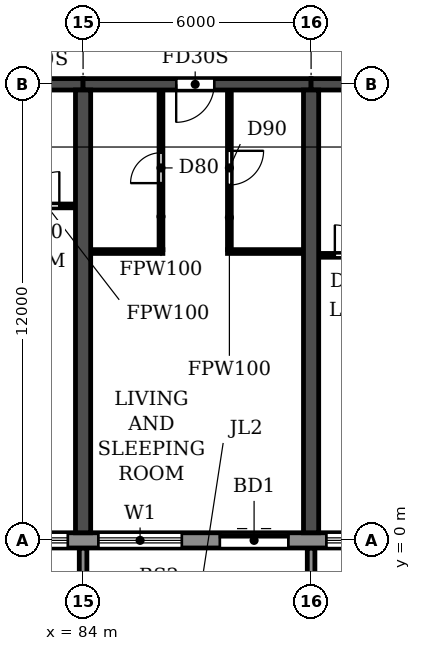
"""IFC4 building model, lengths in metres.
Left out: names, types, materials, properties, quantities, classifications, styles, units other than length and angle.
Written with IfcOpenShell. Run it as: python <this file> out.ifc"""

import sys

from ifc_helpers import new_model, si_unit, direction, frame, frame_2d, origin, place, context, subcontext, project, spatial, polyline, rectangle, outline, extrude, source, transform, mapped, element, fill, save


model = new_model("IFC4")
c1 = context("Model", 3, precision=1e-05, world=origin(), true_north=direction((0.0, 1.0)))
c2 = subcontext(c1, "Body", "Model", "MODEL_VIEW")
j1 = project(units=[si_unit("LENGTHUNIT", "METRE"), si_unit("PLANEANGLEUNIT", "RADIAN")], contexts=[c1])
p1 = place(None, origin())
s1 = spatial("IfcSite", under=j1, at=p1, CompositionType="ELEMENT")
p2 = place(p1, origin())
s2 = spatial("IfcBuilding", under=s1, at=p2, CompositionType="ELEMENT")
p3 = place(p2, frame((0.0, 0.0, 49.8)))
s3 = spatial("IfcBuildingStorey", under=s2, at=p3, CompositionType="ELEMENT", Elevation=49.8)
for number, where, z_axis, x_axis in (
    (1, (84.0, 0.2, 0.0), (0.0, 0.0, 1.0), (0.0, 1.0, 0.0)),
    (2, (90.0, 0.2, 0.0), (0.0, 0.0, 1.0), (0.0, 1.0, 0.0)),
):
    element("IfcWall", number, at=place(p3, frame(where, z_axis=z_axis, x_axis=x_axis)), inside=s3, PredefinedType="SHEAR", context=c2, shape_type="SweptSolid", body=[
        extrude(rectangle(XDim=11.65, YDim=0.4, at=frame_2d((5.825, 0.0))), origin(), (0.0, 0.0, 1.0), 3.0),
    ])
p4 = place(p3, frame((78.0, 12.0, 0.0), z_axis=(0.0, 0.0, 1.0), x_axis=(1.0, 0.0, 0.0)))
e3 = element("IfcWall", 3, at=p4, inside=s3, PredefinedType="SHEAR", context=c2, shape_type="SweptSolid", body=[
    extrude(rectangle(XDim=6.0, YDim=0.3, at=frame_2d((3.0, 0.0))), origin(), (0.0, 0.0, 1.0), 2.4),
])
p5 = place(p4, frame((2.45, 0.0, 0.0)))
e4 = element("IfcOpeningElement", 4, at=p5, cuts=e3, PredefinedType="OPENING", context=c2, shape_type="SweptSolid", body=[
    extrude(rectangle(XDim=1.0, YDim=2.1, at=frame_2d((0.5, 1.05))), frame((0.0, 0.16, 0.0), z_axis=(0.0, -1.0, 0.0), x_axis=(1.0, 0.0, 0.0)), (0.0, 0.0, 1.0), 0.32),
])
p6 = place(p3, frame((84.0, 12.0, 0.0), z_axis=(0.0, 0.0, 1.0), x_axis=(1.0, 0.0, 0.0)))
e5 = element("IfcWall", 5, at=p6, inside=s3, PredefinedType="SHEAR", context=c2, shape_type="SweptSolid", body=[
    extrude(rectangle(XDim=6.0, YDim=0.3, at=frame_2d((3.0, 0.0))), origin(), (0.0, 0.0, 1.0), 2.4),
])
p7 = place(p6, frame((2.45, 0.0, 0.0)))
e6 = element("IfcOpeningElement", 6, at=p7, cuts=e5, PredefinedType="OPENING", context=c2, shape_type="SweptSolid", body=[
    extrude(rectangle(XDim=1.0, YDim=2.1, at=frame_2d((0.5, 1.05))), frame((0.0, 0.16, 0.0), z_axis=(0.0, -1.0, 0.0), x_axis=(1.0, 0.0, 0.0)), (0.0, 0.0, 1.0), 0.32),
])
p8 = place(p3, frame((90.0, 12.0, 0.0), z_axis=(0.0, 0.0, 1.0), x_axis=(1.0, 0.0, 0.0)))
e7 = element("IfcWall", 7, at=p8, inside=s3, PredefinedType="SHEAR", context=c2, shape_type="SweptSolid", body=[
    extrude(rectangle(XDim=6.0, YDim=0.3, at=frame_2d((3.0, 0.0))), origin(), (0.0, 0.0, 1.0), 2.4),
])
p9 = place(p8, frame((2.45, 0.0, 0.0)))
e8 = element("IfcOpeningElement", 8, at=p9, cuts=e7, PredefinedType="OPENING", context=c2, shape_type="SweptSolid", body=[
    extrude(rectangle(XDim=1.0, YDim=2.1, at=frame_2d((0.5, 1.05))), frame((0.0, 0.16, 0.0), z_axis=(0.0, -1.0, 0.0), x_axis=(1.0, 0.0, 0.0)), (0.0, 0.0, 1.0), 0.32),
])
p10 = place(p3, frame((4.683, 0.0, 0.0), z_axis=(0.0, 0.0, 1.0), x_axis=(1.0, 0.0, 0.0)))
e9 = element("IfcWall", 9, at=p10, inside=s3, PredefinedType="STANDARD", context=c2, shape_type="SweptSolid", body=[
    extrude(rectangle(XDim=92.634, YDim=0.4, at=frame_2d((46.317, 0.0))), origin(), (0.0, 0.0, 1.0), 3.0),
])
p11 = place(p10, frame((1.717, 0.0, 0.9)))
e10 = element("IfcOpeningElement", 10, at=p11, cuts=e9, PredefinedType="OPENING", context=c2, shape_type="SweptSolid", body=[
    extrude(rectangle(XDim=2.2, YDim=1.5, at=frame_2d((1.1, 0.75))), frame((0.0, 0.21, 0.0), z_axis=(0.0, -1.0, 0.0), x_axis=(1.0, 0.0, 0.0)), (0.0, 0.0, 1.0), 0.42),
])
p12 = place(p10, frame((4.717, 0.0, 0.9)))
e11 = element("IfcOpeningElement", 11, at=p12, cuts=e9, PredefinedType="OPENING", context=c2, shape_type="SweptSolid", body=[
    extrude(rectangle(XDim=2.2, YDim=1.5, at=frame_2d((1.1, 0.75))), frame((0.0, 0.21, 0.0), z_axis=(0.0, -1.0, 0.0), x_axis=(1.0, 0.0, 0.0)), (0.0, 0.0, 1.0), 0.42),
])
p13 = place(p10, frame((7.717, 0.0, 0.9)))
e12 = element("IfcOpeningElement", 12, at=p13, cuts=e9, PredefinedType="OPENING", context=c2, shape_type="SweptSolid", body=[
    extrude(rectangle(XDim=2.2, YDim=1.5, at=frame_2d((1.1, 0.75))), frame((0.0, 0.21, 0.0), z_axis=(0.0, -1.0, 0.0), x_axis=(1.0, 0.0, 0.0)), (0.0, 0.0, 1.0), 0.42),
])
p14 = place(p10, frame((10.917, 0.0, 0.0)))
e13 = element("IfcOpeningElement", 13, at=p14, cuts=e9, PredefinedType="OPENING", context=c2, shape_type="SweptSolid", body=[
    extrude(rectangle(XDim=1.8, YDim=2.4, at=frame_2d((0.9, 1.2))), frame((0.0, 0.21, 0.0), z_axis=(0.0, -1.0, 0.0), x_axis=(1.0, 0.0, 0.0)), (0.0, 0.0, 1.0), 0.42),
])
p15 = place(p10, frame((13.717, 0.0, 0.9)))
e14 = element("IfcOpeningElement", 14, at=p15, cuts=e9, PredefinedType="OPENING", context=c2, shape_type="SweptSolid", body=[
    extrude(rectangle(XDim=2.2, YDim=1.5, at=frame_2d((1.1, 0.75))), frame((0.0, 0.21, 0.0), z_axis=(0.0, -1.0, 0.0), x_axis=(1.0, 0.0, 0.0)), (0.0, 0.0, 1.0), 0.42),
])
p16 = place(p10, frame((16.717, 0.0, 0.9)))
e15 = element("IfcOpeningElement", 15, at=p16, cuts=e9, PredefinedType="OPENING", context=c2, shape_type="SweptSolid", body=[
    extrude(rectangle(XDim=2.2, YDim=1.5, at=frame_2d((1.1, 0.75))), frame((0.0, 0.21, 0.0), z_axis=(0.0, -1.0, 0.0), x_axis=(1.0, 0.0, 0.0)), (0.0, 0.0, 1.0), 0.42),
])
p17 = place(p10, frame((19.917, 0.0, 0.0)))
e16 = element("IfcOpeningElement", 16, at=p17, cuts=e9, PredefinedType="OPENING", context=c2, shape_type="SweptSolid", body=[
    extrude(rectangle(XDim=1.8, YDim=2.4, at=frame_2d((0.9, 1.2))), frame((0.0, 0.21, 0.0), z_axis=(0.0, -1.0, 0.0), x_axis=(1.0, 0.0, 0.0)), (0.0, 0.0, 1.0), 0.42),
])
p18 = place(p10, frame((22.717, 0.0, 0.9)))
e17 = element("IfcOpeningElement", 17, at=p18, cuts=e9, PredefinedType="OPENING", context=c2, shape_type="SweptSolid", body=[
    extrude(rectangle(XDim=2.2, YDim=1.5, at=frame_2d((1.1, 0.75))), frame((0.0, 0.21, 0.0), z_axis=(0.0, -1.0, 0.0), x_axis=(1.0, 0.0, 0.0)), (0.0, 0.0, 1.0), 0.42),
])
p19 = place(p10, frame((25.717, 0.0, 0.9)))
e18 = element("IfcOpeningElement", 18, at=p19, cuts=e9, PredefinedType="OPENING", context=c2, shape_type="SweptSolid", body=[
    extrude(rectangle(XDim=2.2, YDim=1.5, at=frame_2d((1.1, 0.75))), frame((0.0, 0.21, 0.0), z_axis=(0.0, -1.0, 0.0), x_axis=(1.0, 0.0, 0.0)), (0.0, 0.0, 1.0), 0.42),
])
p20 = place(p10, frame((28.717, 0.0, 0.9)))
e19 = element("IfcOpeningElement", 19, at=p20, cuts=e9, PredefinedType="OPENING", context=c2, shape_type="SweptSolid", body=[
    extrude(rectangle(XDim=2.2, YDim=1.5, at=frame_2d((1.1, 0.75))), frame((0.0, 0.21, 0.0), z_axis=(0.0, -1.0, 0.0), x_axis=(1.0, 0.0, 0.0)), (0.0, 0.0, 1.0), 0.42),
])
p21 = place(p10, frame((31.717, 0.0, 0.9)))
e20 = element("IfcOpeningElement", 20, at=p21, cuts=e9, PredefinedType="OPENING", context=c2, shape_type="SweptSolid", body=[
    extrude(rectangle(XDim=2.2, YDim=1.5, at=frame_2d((1.1, 0.75))), frame((0.0, 0.21, 0.0), z_axis=(0.0, -1.0, 0.0), x_axis=(1.0, 0.0, 0.0)), (0.0, 0.0, 1.0), 0.42),
])
p22 = place(p10, frame((34.917, 0.0, 0.0)))
e21 = element("IfcOpeningElement", 21, at=p22, cuts=e9, PredefinedType="OPENING", context=c2, shape_type="SweptSolid", body=[
    extrude(rectangle(XDim=1.8, YDim=2.4, at=frame_2d((0.9, 1.2))), frame((0.0, 0.21, 0.0), z_axis=(0.0, -1.0, 0.0), x_axis=(1.0, 0.0, 0.0)), (0.0, 0.0, 1.0), 0.42),
])
p23 = place(p10, frame((37.717, 0.0, 0.9)))
e22 = element("IfcOpeningElement", 22, at=p23, cuts=e9, PredefinedType="OPENING", context=c2, shape_type="SweptSolid", body=[
    extrude(rectangle(XDim=2.2, YDim=1.5, at=frame_2d((1.1, 0.75))), frame((0.0, 0.21, 0.0), z_axis=(0.0, -1.0, 0.0), x_axis=(1.0, 0.0, 0.0)), (0.0, 0.0, 1.0), 0.42),
])
p24 = place(p10, frame((40.717, 0.0, 0.9)))
e23 = element("IfcOpeningElement", 23, at=p24, cuts=e9, PredefinedType="OPENING", context=c2, shape_type="SweptSolid", body=[
    extrude(rectangle(XDim=2.2, YDim=1.5, at=frame_2d((1.1, 0.75))), frame((0.0, 0.21, 0.0), z_axis=(0.0, -1.0, 0.0), x_axis=(1.0, 0.0, 0.0)), (0.0, 0.0, 1.0), 0.42),
])
p25 = place(p10, frame((43.717, 0.0, 0.9)))
e24 = element("IfcOpeningElement", 24, at=p25, cuts=e9, PredefinedType="OPENING", context=c2, shape_type="SweptSolid", body=[
    extrude(rectangle(XDim=2.2, YDim=1.5, at=frame_2d((1.1, 0.75))), frame((0.0, 0.21, 0.0), z_axis=(0.0, -1.0, 0.0), x_axis=(1.0, 0.0, 0.0)), (0.0, 0.0, 1.0), 0.42),
])
p26 = place(p10, frame((46.917, 0.0, 0.0)))
e25 = element("IfcOpeningElement", 25, at=p26, cuts=e9, PredefinedType="OPENING", context=c2, shape_type="SweptSolid", body=[
    extrude(rectangle(XDim=1.8, YDim=2.4, at=frame_2d((0.9, 1.2))), frame((0.0, 0.21, 0.0), z_axis=(0.0, -1.0, 0.0), x_axis=(1.0, 0.0, 0.0)), (0.0, 0.0, 1.0), 0.42),
])
p27 = place(p10, frame((49.717, 0.0, 0.9)))
e26 = element("IfcOpeningElement", 26, at=p27, cuts=e9, PredefinedType="OPENING", context=c2, shape_type="SweptSolid", body=[
    extrude(rectangle(XDim=2.2, YDim=1.5, at=frame_2d((1.1, 0.75))), frame((0.0, 0.21, 0.0), z_axis=(0.0, -1.0, 0.0), x_axis=(1.0, 0.0, 0.0)), (0.0, 0.0, 1.0), 0.42),
])
p28 = place(p10, frame((52.717, 0.0, 0.9)))
e27 = element("IfcOpeningElement", 27, at=p28, cuts=e9, PredefinedType="OPENING", context=c2, shape_type="SweptSolid", body=[
    extrude(rectangle(XDim=2.2, YDim=1.5, at=frame_2d((1.1, 0.75))), frame((0.0, 0.21, 0.0), z_axis=(0.0, -1.0, 0.0), x_axis=(1.0, 0.0, 0.0)), (0.0, 0.0, 1.0), 0.42),
])
p29 = place(p10, frame((55.717, 0.0, 0.9)))
e28 = element("IfcOpeningElement", 28, at=p29, cuts=e9, PredefinedType="OPENING", context=c2, shape_type="SweptSolid", body=[
    extrude(rectangle(XDim=2.2, YDim=1.5, at=frame_2d((1.1, 0.75))), frame((0.0, 0.21, 0.0), z_axis=(0.0, -1.0, 0.0), x_axis=(1.0, 0.0, 0.0)), (0.0, 0.0, 1.0), 0.42),
])
p30 = place(p10, frame((58.917, 0.0, 0.0)))
e29 = element("IfcOpeningElement", 29, at=p30, cuts=e9, PredefinedType="OPENING", context=c2, shape_type="SweptSolid", body=[
    extrude(rectangle(XDim=1.8, YDim=2.4, at=frame_2d((0.9, 1.2))), frame((0.0, 0.21, 0.0), z_axis=(0.0, -1.0, 0.0), x_axis=(1.0, 0.0, 0.0)), (0.0, 0.0, 1.0), 0.42),
])
p31 = place(p10, frame((61.717, 0.0, 0.9)))
e30 = element("IfcOpeningElement", 30, at=p31, cuts=e9, PredefinedType="OPENING", context=c2, shape_type="SweptSolid", body=[
    extrude(rectangle(XDim=2.2, YDim=1.5, at=frame_2d((1.1, 0.75))), frame((0.0, 0.21, 0.0), z_axis=(0.0, -1.0, 0.0), x_axis=(1.0, 0.0, 0.0)), (0.0, 0.0, 1.0), 0.42),
])
p32 = place(p10, frame((64.717, 0.0, 0.9)))
e31 = element("IfcOpeningElement", 31, at=p32, cuts=e9, PredefinedType="OPENING", context=c2, shape_type="SweptSolid", body=[
    extrude(rectangle(XDim=2.2, YDim=1.5, at=frame_2d((1.1, 0.75))), frame((0.0, 0.21, 0.0), z_axis=(0.0, -1.0, 0.0), x_axis=(1.0, 0.0, 0.0)), (0.0, 0.0, 1.0), 0.42),
])
p33 = place(p10, frame((67.717, 0.0, 0.9)))
e32 = element("IfcOpeningElement", 32, at=p33, cuts=e9, PredefinedType="OPENING", context=c2, shape_type="SweptSolid", body=[
    extrude(rectangle(XDim=2.2, YDim=1.5, at=frame_2d((1.1, 0.75))), frame((0.0, 0.21, 0.0), z_axis=(0.0, -1.0, 0.0), x_axis=(1.0, 0.0, 0.0)), (0.0, 0.0, 1.0), 0.42),
])
p34 = place(p10, frame((70.917, 0.0, 0.0)))
e33 = element("IfcOpeningElement", 33, at=p34, cuts=e9, PredefinedType="OPENING", context=c2, shape_type="SweptSolid", body=[
    extrude(rectangle(XDim=1.8, YDim=2.4, at=frame_2d((0.9, 1.2))), frame((0.0, 0.21, 0.0), z_axis=(0.0, -1.0, 0.0), x_axis=(1.0, 0.0, 0.0)), (0.0, 0.0, 1.0), 0.42),
])
p35 = place(p10, frame((73.717, 0.0, 0.9)))
e34 = element("IfcOpeningElement", 34, at=p35, cuts=e9, PredefinedType="OPENING", context=c2, shape_type="SweptSolid", body=[
    extrude(rectangle(XDim=2.2, YDim=1.5, at=frame_2d((1.1, 0.75))), frame((0.0, 0.21, 0.0), z_axis=(0.0, -1.0, 0.0), x_axis=(1.0, 0.0, 0.0)), (0.0, 0.0, 1.0), 0.42),
])
p36 = place(p10, frame((76.717, 0.0, 0.9)))
e35 = element("IfcOpeningElement", 35, at=p36, cuts=e9, PredefinedType="OPENING", context=c2, shape_type="SweptSolid", body=[
    extrude(rectangle(XDim=2.2, YDim=1.5, at=frame_2d((1.1, 0.75))), frame((0.0, 0.21, 0.0), z_axis=(0.0, -1.0, 0.0), x_axis=(1.0, 0.0, 0.0)), (0.0, 0.0, 1.0), 0.42),
])
p37 = place(p10, frame((79.717, 0.0, 0.9)))
e36 = element("IfcOpeningElement", 36, at=p37, cuts=e9, PredefinedType="OPENING", context=c2, shape_type="SweptSolid", body=[
    extrude(rectangle(XDim=2.2, YDim=1.5, at=frame_2d((1.1, 0.75))), frame((0.0, 0.21, 0.0), z_axis=(0.0, -1.0, 0.0), x_axis=(1.0, 0.0, 0.0)), (0.0, 0.0, 1.0), 0.42),
])
p38 = place(p10, frame((82.917, 0.0, 0.0)))
e37 = element("IfcOpeningElement", 37, at=p38, cuts=e9, PredefinedType="OPENING", context=c2, shape_type="SweptSolid", body=[
    extrude(rectangle(XDim=1.8, YDim=2.4, at=frame_2d((0.9, 1.2))), frame((0.0, 0.21, 0.0), z_axis=(0.0, -1.0, 0.0), x_axis=(1.0, 0.0, 0.0)), (0.0, 0.0, 1.0), 0.42),
])
p39 = place(p10, frame((85.717, 0.0, 0.9)))
e38 = element("IfcOpeningElement", 38, at=p39, cuts=e9, PredefinedType="OPENING", context=c2, shape_type="SweptSolid", body=[
    extrude(rectangle(XDim=2.2, YDim=1.5, at=frame_2d((1.1, 0.75))), frame((0.0, 0.21, 0.0), z_axis=(0.0, -1.0, 0.0), x_axis=(1.0, 0.0, 0.0)), (0.0, 0.0, 1.0), 0.42),
])
p40 = place(p10, frame((88.717, 0.0, 0.9)))
e39 = element("IfcOpeningElement", 39, at=p40, cuts=e9, PredefinedType="OPENING", context=c2, shape_type="SweptSolid", body=[
    extrude(rectangle(XDim=2.2, YDim=1.5, at=frame_2d((1.1, 0.75))), frame((0.0, 0.21, 0.0), z_axis=(0.0, -1.0, 0.0), x_axis=(1.0, 0.0, 0.0)), (0.0, 0.0, 1.0), 0.42),
])
m1 = source(origin(), c2, "Body", "SweptSolid", [
    extrude(outline(polyline([(0.0, 0.0), (0.2, 0.0), (0.2, 1.65), (0.0, 1.65), (0.0, 0.0)])), origin(), (0.0, 0.0, 1.0), 3.1),
])
for number, where in (
    (40, (83.9, -1.85, 0.0)),
    (41, (89.9, -1.85, 0.0)),
):
    element("IfcWall", number, at=place(p3, frame(where)), inside=s3, PredefinedType="STANDARD", context=c2, shape_type="MappedRepresentation", body=[
        mapped(m1, transform((0.0, 0.0, 0.0))),
    ])
p41 = place(p3, frame((90.21, 7.5, 0.0), z_axis=(0.0, 0.0, 1.0), x_axis=(1.0, 0.0, 0.0)))
e42 = element("IfcWall", 42, at=p41, inside=s3, PredefinedType="PARTITIONING", context=c2, shape_type="SweptSolid", body=[
    extrude(rectangle(XDim=1.89, YDim=0.1, at=frame_2d((0.945, 0.0))), origin(), (0.0, 0.0, 1.0), 3.0),
])
p42 = place(p41, frame((0.415, 0.0, 0.0)))
e43 = element("IfcOpeningElement", 43, at=p42, cuts=e42, PredefinedType="OPENING", context=c2, shape_type="SweptSolid", body=[
    extrude(rectangle(XDim=0.8, YDim=2.1, at=frame_2d((0.4, 1.05))), frame((0.0, 0.06, 0.0), z_axis=(0.0, -1.0, 0.0), x_axis=(1.0, 0.0, 0.0)), (0.0, 0.0, 1.0), 0.12),
])
p43 = place(p3, frame((84.21, 7.6, 0.0), z_axis=(0.0, 0.0, 1.0), x_axis=(1.0, 0.0, 0.0)))
e44 = element("IfcWall", 44, at=p43, inside=s3, PredefinedType="PARTITIONING", context=c2, shape_type="SweptSolid", body=[
    extrude(rectangle(XDim=1.89, YDim=0.1, at=frame_2d((0.945, 0.0))), origin(), (0.0, 0.0, 1.0), 3.0),
])
p44 = place(p3, frame((87.8, 7.6, 0.0), z_axis=(0.0, 0.0, 1.0), x_axis=(1.0, 0.0, 0.0)))
e45 = element("IfcWall", 45, at=p44, inside=s3, PredefinedType="PARTITIONING", context=c2, shape_type="SweptSolid", body=[
    extrude(rectangle(XDim=1.99, YDim=0.1, at=frame_2d((0.995, 0.0))), origin(), (0.0, 0.0, 1.0), 3.0),
])
p45 = place(p3, frame((81.8, 8.8, 0.0), z_axis=(0.0, 0.0, 1.0), x_axis=(1.0, 0.0, 0.0)))
e46 = element("IfcWall", 46, at=p45, inside=s3, PredefinedType="PARTITIONING", context=c2, shape_type="SweptSolid", body=[
    extrude(rectangle(XDim=1.99, YDim=0.1, at=frame_2d((0.995, 0.0))), origin(), (0.0, 0.0, 1.0), 3.0),
])
p46 = place(p45, frame((0.675, 0.0, 0.0)))
e47 = element("IfcOpeningElement", 47, at=p46, cuts=e46, PredefinedType="OPENING", context=c2, shape_type="SweptSolid", body=[
    extrude(rectangle(XDim=0.9, YDim=2.1, at=frame_2d((0.45, 1.05))), frame((0.0, 0.06, 0.0), z_axis=(0.0, -1.0, 0.0), x_axis=(1.0, 0.0, 0.0)), (0.0, 0.0, 1.0), 0.12),
])
p47 = place(p3, frame((86.05, 7.65, 0.0), z_axis=(0.0, 0.0, 1.0), x_axis=(0.0, 1.0, 0.0)))
e48 = element("IfcWall", 48, at=p47, inside=s3, PredefinedType="PARTITIONING", context=c2, shape_type="SweptSolid", body=[
    extrude(rectangle(XDim=4.19, YDim=0.1, at=frame_2d((2.095, 0.0))), origin(), (0.0, 0.0, 1.0), 3.0),
])
p48 = place(p47, frame((1.75, 0.0, 0.0)))
e49 = element("IfcOpeningElement", 49, at=p48, cuts=e48, PredefinedType="OPENING", context=c2, shape_type="SweptSolid", body=[
    extrude(rectangle(XDim=0.8, YDim=2.1, at=frame_2d((0.4, 1.05))), frame((0.0, 0.06, 0.0), z_axis=(0.0, -1.0, 0.0), x_axis=(1.0, 0.0, 0.0)), (0.0, 0.0, 1.0), 0.12),
])
p49 = place(p3, frame((87.85, 7.65, 0.0), z_axis=(0.0, 0.0, 1.0), x_axis=(0.0, 1.0, 0.0)))
e50 = element("IfcWall", 50, at=p49, inside=s3, PredefinedType="PARTITIONING", context=c2, shape_type="SweptSolid", body=[
    extrude(rectangle(XDim=4.19, YDim=0.1, at=frame_2d((2.095, 0.0))), origin(), (0.0, 0.0, 1.0), 3.0),
])
p50 = place(p49, frame((1.7, 0.0, 0.0)))
e51 = element("IfcOpeningElement", 51, at=p50, cuts=e50, PredefinedType="OPENING", context=c2, shape_type="SweptSolid", body=[
    extrude(rectangle(XDim=0.9, YDim=2.1, at=frame_2d((0.45, 1.05))), frame((0.0, 0.06, 0.0), z_axis=(0.0, -1.0, 0.0), x_axis=(1.0, 0.0, 0.0)), (0.0, 0.0, 1.0), 0.12),
])
p51 = place(p36, origin())
e52 = element("IfcWindow", 52, at=p51, inside=s3, PartitioningType="DOUBLE_PANEL_HORIZONTAL", PredefinedType="WINDOW", context=c2, shape_type="SweptSolid", body=[
    extrude(rectangle(XDim=2.2, YDim=1.5, at=frame_2d((1.1, 0.75))), frame((0.0, 0.03, 0.0), z_axis=(0.0, -1.0, 0.0), x_axis=(1.0, 0.0, 0.0)), (0.0, 0.0, 1.0), 0.06),
])
fill(e35, e52)
p52 = place(p37, origin())
e53 = element("IfcWindow", 53, at=p52, inside=s3, PartitioningType="DOUBLE_PANEL_HORIZONTAL", PredefinedType="WINDOW", context=c2, shape_type="SweptSolid", body=[
    extrude(rectangle(XDim=2.2, YDim=1.5, at=frame_2d((1.1, 0.75))), frame((0.0, 0.03, 0.0), z_axis=(0.0, -1.0, 0.0), x_axis=(1.0, 0.0, 0.0)), (0.0, 0.0, 1.0), 0.06),
])
fill(e36, e53)
p53 = place(p38, origin())
e54 = element("IfcDoor", 54, at=p53, inside=s3, OperationType="DOUBLE_DOOR_SLIDING", PredefinedType="DOOR", context=c2, shape_type="SweptSolid", body=[
    extrude(rectangle(XDim=1.8, YDim=2.4, at=frame_2d((0.9, 1.2))), frame((0.0, 0.025, 0.0), z_axis=(0.0, -1.0, 0.0), x_axis=(1.0, 0.0, 0.0)), (0.0, 0.0, 1.0), 0.05),
])
fill(e37, e54)
p54 = place(p39, origin())
e55 = element("IfcWindow", 55, at=p54, inside=s3, PartitioningType="DOUBLE_PANEL_HORIZONTAL", PredefinedType="WINDOW", context=c2, shape_type="SweptSolid", body=[
    extrude(rectangle(XDim=2.2, YDim=1.5, at=frame_2d((1.1, 0.75))), frame((0.0, 0.03, 0.0), z_axis=(0.0, -1.0, 0.0), x_axis=(1.0, 0.0, 0.0)), (0.0, 0.0, 1.0), 0.06),
])
fill(e38, e55)
p55 = place(p46, origin())
e56 = element("IfcDoor", 56, at=p55, inside=s3, OperationType="SINGLE_SWING_RIGHT", PredefinedType="DOOR", context=c2, shape_type="SweptSolid", body=[
    extrude(rectangle(XDim=0.9, YDim=2.1, at=frame_2d((0.45, 1.05))), frame((0.0, 0.025, 0.0), z_axis=(0.0, -1.0, 0.0), x_axis=(1.0, 0.0, 0.0)), (0.0, 0.0, 1.0), 0.05),
])
fill(e47, e56)
p56 = place(p48, origin())
e57 = element("IfcDoor", 57, at=p56, inside=s3, OperationType="SINGLE_SWING_LEFT", PredefinedType="DOOR", context=c2, shape_type="SweptSolid", body=[
    extrude(rectangle(XDim=0.8, YDim=2.1, at=frame_2d((0.4, 1.05))), frame((0.0, 0.025, 0.0), z_axis=(0.0, -1.0, 0.0), x_axis=(1.0, 0.0, 0.0)), (0.0, 0.0, 1.0), 0.05),
])
fill(e49, e57)
p57 = place(p7, frame((1.0, 0.0, 0.0), z_axis=(0.0, 0.0, 1.0), x_axis=(-1.0, 0.0, 0.0)))
e58 = element("IfcDoor", 58, at=p57, inside=s3, OperationType="SINGLE_SWING_RIGHT", PredefinedType="DOOR", context=c2, shape_type="SweptSolid", body=[
    extrude(rectangle(XDim=1.0, YDim=2.1, at=frame_2d((0.5, 1.05))), frame((0.0, 0.025, 0.0), z_axis=(0.0, -1.0, 0.0), x_axis=(1.0, 0.0, 0.0)), (0.0, 0.0, 1.0), 0.05),
])
fill(e6, e58)
p58 = place(p50, frame((0.9, 0.0, 0.0), z_axis=(0.0, 0.0, 1.0), x_axis=(-1.0, 0.0, 0.0)))
e59 = element("IfcDoor", 59, at=p58, inside=s3, OperationType="SINGLE_SWING_LEFT", PredefinedType="DOOR", context=c2, shape_type="SweptSolid", body=[
    extrude(rectangle(XDim=0.9, YDim=2.1, at=frame_2d((0.45, 1.05))), frame((0.0, 0.025, 0.0), z_axis=(0.0, -1.0, 0.0), x_axis=(1.0, 0.0, 0.0)), (0.0, 0.0, 1.0), 0.05),
])
fill(e51, e59)
p59 = place(p42, origin())
e60 = element("IfcDoor", 60, at=p59, inside=s3, OperationType="SINGLE_SWING_LEFT", PredefinedType="DOOR", context=c2, shape_type="SweptSolid", body=[
    extrude(rectangle(XDim=0.8, YDim=2.1, at=frame_2d((0.4, 1.05))), frame((0.0, 0.025, 0.0), z_axis=(0.0, -1.0, 0.0), x_axis=(1.0, 0.0, 0.0)), (0.0, 0.0, 1.0), 0.05),
])
fill(e43, e60)
save(model, sys.argv[1])
